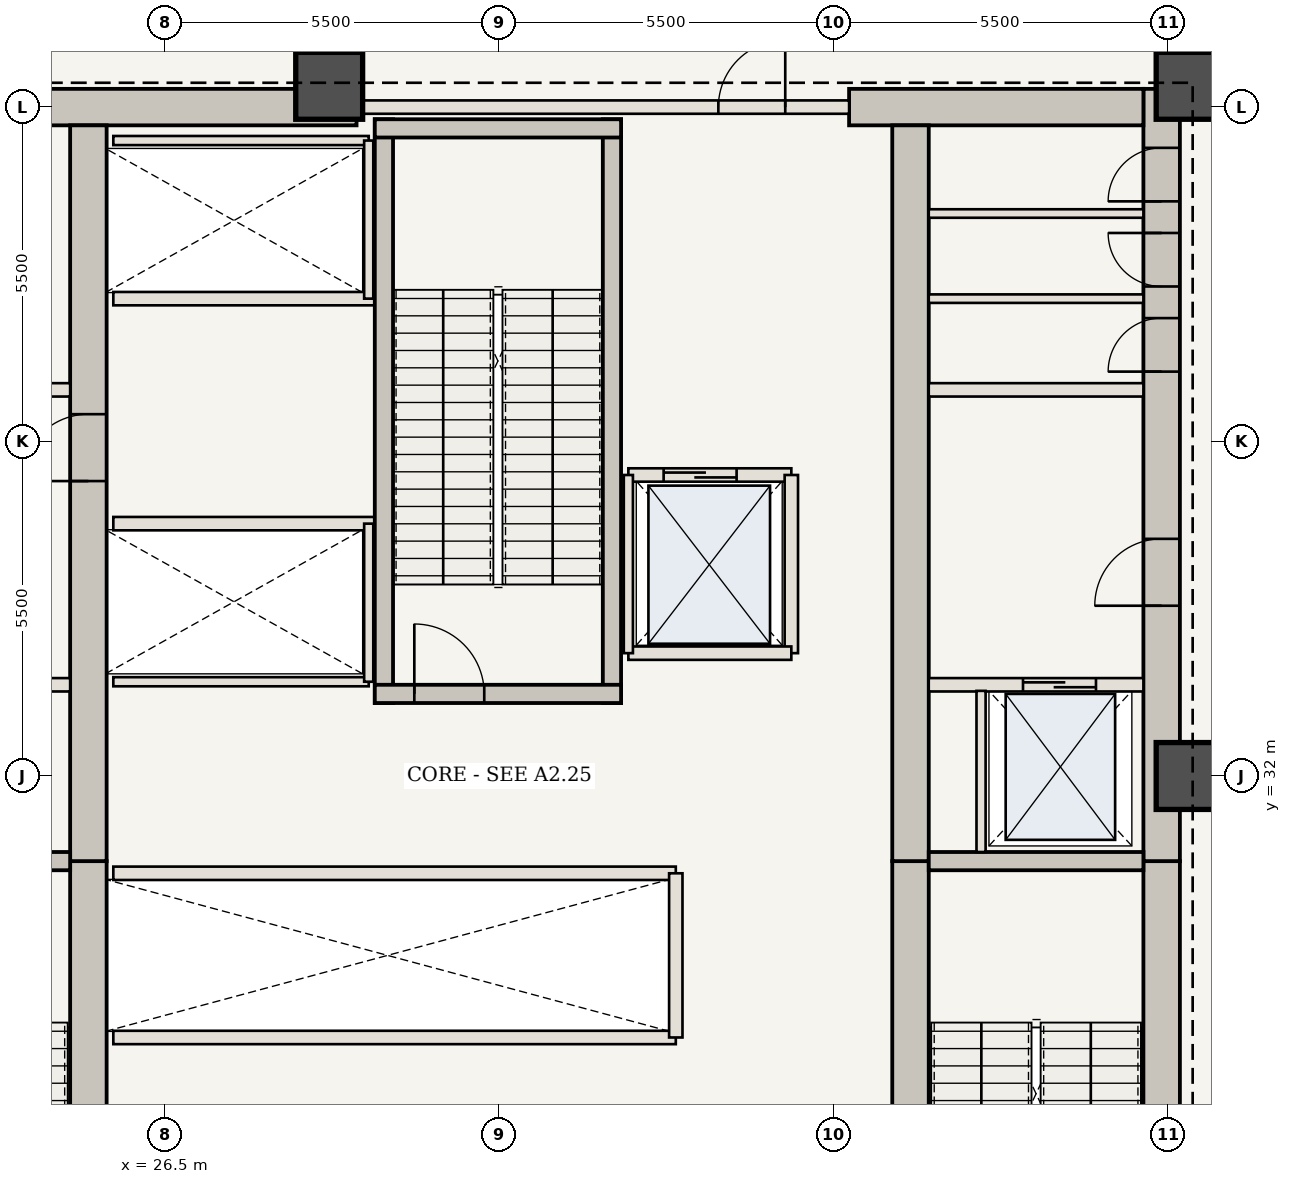
"""IFC4 building model, lengths in metres.
Left out: names, types, materials, properties, quantities, classifications, styles, units other than length and angle.
Written with IfcOpenShell. Run it as: python <this file> out.ifc"""

import sys

from ifc_helpers import new_model, si_unit, direction, frame, frame_2d, origin, origin_2d, place, context, subcontext, project, spatial, rectangle, extrude, element, fill, save


model = new_model("IFC4")
c1 = context("Model", 3, precision=1e-05, world=origin(), true_north=direction((0.0, 1.0)))
c2 = subcontext(c1, "Body", "Model", "MODEL_VIEW")
j1 = project(units=[si_unit("LENGTHUNIT", "METRE"), si_unit("PLANEANGLEUNIT", "RADIAN")], contexts=[c1])
p1 = place(None, origin())
s1 = spatial("IfcSite", under=j1, at=p1, CompositionType="ELEMENT")
p2 = place(p1, origin())
s2 = spatial("IfcBuilding", under=s1, at=p2, CompositionType="ELEMENT")
p3 = place(p2, frame((0.0, 0.0, 99.75)))
s3 = spatial("IfcBuildingStorey", under=s2, at=p3, CompositionType="ELEMENT", Elevation=99.75)
p4 = place(p3, frame((42.89, 20.65, 0.0), z_axis=(0.0, 0.0, 1.0), x_axis=(0.0, 1.0, 0.0)))
e1 = element("IfcWall", 1, at=p4, inside=s3, PredefinedType="SHEAR", context=c2, shape_type="SweptSolid", body=[
    extrude(rectangle(XDim=9.95, YDim=0.6, at=frame_2d((4.975, 0.0))), origin(), (0.0, 0.0, 1.0), 6.3),
])
p5 = place(p4, frame((1.1, 0.0, 0.0)))
e2 = element("IfcOpeningElement", 2, at=p5, cuts=e1, PredefinedType="OPENING", context=c2, shape_type="SweptSolid", body=[
    extrude(rectangle(XDim=1.15, YDim=2.15, at=frame_2d((0.575, 1.075))), frame((0.0, 0.31, 0.0), z_axis=(0.0, -1.0, 0.0), x_axis=(1.0, 0.0, 0.0)), (0.0, 0.0, 1.0), 0.62),
])
p6 = place(p3, frame((42.89, 30.6, 0.0), z_axis=(0.0, 0.0, 1.0), x_axis=(0.0, 1.0, 0.0)))
e3 = element("IfcWall", 3, at=p6, inside=s3, PredefinedType="SHEAR", context=c2, shape_type="SweptSolid", body=[
    extrude(rectangle(XDim=12.7, YDim=0.6, at=frame_2d((6.35, 0.0))), origin(), (0.0, 0.0, 1.0), 6.3),
])
p7 = place(p6, frame((4.2, 0.0, 0.0)))
e4 = element("IfcOpeningElement", 4, at=p7, cuts=e3, PredefinedType="OPENING", context=c2, shape_type="SweptSolid", body=[
    extrude(rectangle(XDim=1.1, YDim=2.15, at=frame_2d((0.55, 1.075))), frame((0.0, 0.31, 0.0), z_axis=(0.0, -1.0, 0.0), x_axis=(1.0, 0.0, 0.0)), (0.0, 0.0, 1.0), 0.62),
])
p8 = place(p6, frame((8.05, 0.0, 0.0)))
e5 = element("IfcOpeningElement", 5, at=p8, cuts=e3, PredefinedType="OPENING", context=c2, shape_type="SweptSolid", body=[
    extrude(rectangle(XDim=0.88, YDim=2.1, at=frame_2d((0.44, 1.05))), frame((0.0, 0.31, 0.0), z_axis=(0.0, -1.0, 0.0), x_axis=(1.0, 0.0, 0.0)), (0.0, 0.0, 1.0), 0.62),
])
p9 = place(p6, frame((9.45, 0.0, 0.0)))
e6 = element("IfcOpeningElement", 6, at=p9, cuts=e3, PredefinedType="OPENING", context=c2, shape_type="SweptSolid", body=[
    extrude(rectangle(XDim=0.88, YDim=2.1, at=frame_2d((0.44, 1.05))), frame((0.0, 0.31, 0.0), z_axis=(0.0, -1.0, 0.0), x_axis=(1.0, 0.0, 0.0)), (0.0, 0.0, 1.0), 0.62),
])
p10 = place(p6, frame((10.85, 0.0, 0.0)))
e7 = element("IfcOpeningElement", 7, at=p10, cuts=e3, PredefinedType="OPENING", context=c2, shape_type="SweptSolid", body=[
    extrude(rectangle(XDim=0.88, YDim=2.1, at=frame_2d((0.44, 1.05))), frame((0.0, 0.31, 0.0), z_axis=(0.0, -1.0, 0.0), x_axis=(1.0, 0.0, 0.0)), (0.0, 0.0, 1.0), 0.62),
])
p11 = place(p3, frame((21.41, 43.0, 0.0), z_axis=(0.0, 0.0, 1.0), x_axis=(1.0, 0.0, 0.0)))
e8 = element("IfcWall", 8, at=p11, inside=s3, PredefinedType="SHEAR", context=c2, shape_type="SweptSolid", body=[
    extrude(rectangle(XDim=8.24, YDim=0.6, at=frame_2d((4.12, 0.0))), origin(), (0.0, 0.0, 1.0), 6.3),
])
p12 = place(p3, frame((37.75, 43.0, 0.0), z_axis=(0.0, 0.0, 1.0), x_axis=(1.0, 0.0, 0.0)))
e9 = element("IfcWall", 9, at=p12, inside=s3, PredefinedType="SHEAR", context=c2, shape_type="SweptSolid", body=[
    extrude(rectangle(XDim=4.84, YDim=0.6, at=frame_2d((2.42, 0.0))), origin(), (0.0, 0.0, 1.0), 6.3),
])
p13 = place(p3, frame((25.24, 21.25, 0.0), z_axis=(0.0, 0.0, 1.0), x_axis=(0.0, 1.0, 0.0)))
e10 = element("IfcWall", 10, at=p13, inside=s3, PredefinedType="SHEAR", context=c2, shape_type="SweptSolid", body=[
    extrude(rectangle(XDim=9.35, YDim=0.6, at=frame_2d((4.675, 0.0))), origin(), (0.0, 0.0, 1.0), 6.3),
])
p14 = place(p3, frame((25.24, 30.6, 0.0), z_axis=(0.0, 0.0, 1.0), x_axis=(0.0, 1.0, 0.0)))
e11 = element("IfcWall", 11, at=p14, inside=s3, PredefinedType="SHEAR", context=c2, shape_type="SweptSolid", body=[
    extrude(rectangle(XDim=12.1, YDim=0.6, at=frame_2d((6.05, 0.0))), origin(), (0.0, 0.0, 1.0), 6.3),
])
p15 = place(p14, frame((6.25, 0.0, 0.0)))
e12 = element("IfcOpeningElement", 12, at=p15, cuts=e11, PredefinedType="OPENING", context=c2, shape_type="SweptSolid", body=[
    extrude(rectangle(XDim=1.1, YDim=2.15, at=frame_2d((0.55, 1.075))), frame((0.0, 0.31, 0.0), z_axis=(0.0, -1.0, 0.0), x_axis=(1.0, 0.0, 0.0)), (0.0, 0.0, 1.0), 0.62),
])
p16 = place(p3, frame((38.76, 21.25, 0.0), z_axis=(0.0, 0.0, 1.0), x_axis=(0.0, 1.0, 0.0)))
e13 = element("IfcWall", 13, at=p16, inside=s3, PredefinedType="SHEAR", context=c2, shape_type="SweptSolid", body=[
    extrude(rectangle(XDim=9.35, YDim=0.6, at=frame_2d((4.675, 0.0))), origin(), (0.0, 0.0, 1.0), 6.3),
])
p17 = place(p3, frame((38.76, 30.6, 0.0), z_axis=(0.0, 0.0, 1.0), x_axis=(0.0, 1.0, 0.0)))
e14 = element("IfcWall", 14, at=p17, inside=s3, PredefinedType="SHEAR", context=c2, shape_type="SweptSolid", body=[
    extrude(rectangle(XDim=12.1, YDim=0.6, at=frame_2d((6.05, 0.0))), origin(), (0.0, 0.0, 1.0), 6.3),
])
for number, where, z_axis, x_axis in (
    (15, (43.35, 32.0, 0.0), (0.0, 0.0, 1.0), (1.0, 0.0, 0.0)),
    (16, (43.35, 43.35, 0.0), (0.0, 0.0, 1.0), (1.0, 0.0, 0.0)),
    (17, (29.2, 43.35, 0.0), (0.0, 0.0, 1.0), (1.0, 0.0, 0.0)),
):
    element("IfcColumn", number, at=place(p3, frame(where, z_axis=z_axis, x_axis=x_axis)), inside=s3, PredefinedType="COLUMN", context=c2, shape_type="SweptSolid", body=[
        extrude(rectangle(XDim=1.1, YDim=1.1, at=origin_2d()), origin(), (0.0, 0.0, 1.0), 5.88),
    ])
for number, where, z_axis, x_axis in (
    (18, (21.41, 30.6, 0.0), (0.0, 0.0, 1.0), (1.0, 0.0, 0.0)),
    (19, (39.06, 30.6, 0.0), (0.0, 0.0, 1.0), (1.0, 0.0, 0.0)),
):
    element("IfcWall", number, at=place(p3, frame(where, z_axis=z_axis, x_axis=x_axis)), inside=s3, PredefinedType="SHEAR", context=c2, shape_type="SweptSolid", body=[
        extrude(rectangle(XDim=3.53, YDim=0.3, at=frame_2d((1.765, 0.0))), origin(), (0.0, 0.0, 1.0), 5.88),
    ])
p18 = place(p3, frame((21.41, 33.5, 0.0), z_axis=(0.0, 0.0, 1.0), x_axis=(1.0, 0.0, 0.0)))
e20 = element("IfcWall", 20, at=p18, inside=s3, PredefinedType="STANDARD", context=c2, shape_type="SweptSolid", body=[
    extrude(rectangle(XDim=3.53, YDim=0.22, at=frame_2d((1.765, 0.0))), origin(), (0.0, 0.0, 1.0), 5.88),
])
p19 = place(p18, frame((0.75, 0.0, 0.0)))
e21 = element("IfcOpeningElement", 21, at=p19, cuts=e20, PredefinedType="OPENING", context=c2, shape_type="SweptSolid", body=[
    extrude(rectangle(XDim=1.2, YDim=2.2, at=frame_2d((0.6, 1.1))), frame((0.0, 0.12, 0.0), z_axis=(0.0, -1.0, 0.0), x_axis=(1.0, 0.0, 0.0)), (0.0, 0.0, 1.0), 0.24),
])
p20 = place(p3, frame((39.06, 33.5, 0.0), z_axis=(0.0, 0.0, 1.0), x_axis=(1.0, 0.0, 0.0)))
e22 = element("IfcWall", 22, at=p20, inside=s3, PredefinedType="STANDARD", context=c2, shape_type="SweptSolid", body=[
    extrude(rectangle(XDim=3.53, YDim=0.22, at=frame_2d((1.765, 0.0))), origin(), (0.0, 0.0, 1.0), 5.88),
])
p21 = place(p20, frame((1.55, 0.0, 0.0)))
e23 = element("IfcOpeningElement", 23, at=p21, cuts=e22, PredefinedType="OPENING", context=c2, shape_type="SweptSolid", body=[
    extrude(rectangle(XDim=1.2, YDim=2.2, at=frame_2d((0.6, 1.1))), frame((0.0, 0.12, 0.0), z_axis=(0.0, -1.0, 0.0), x_axis=(1.0, 0.0, 0.0)), (0.0, 0.0, 1.0), 0.24),
])
p22 = place(p3, frame((39.92, 30.75, 0.0), z_axis=(0.0, 0.0, 1.0), x_axis=(0.0, 1.0, 0.0)))
e24 = element("IfcWall", 24, at=p22, inside=s3, PredefinedType="STANDARD", context=c2, shape_type="SweptSolid", body=[
    extrude(rectangle(XDim=2.65, YDim=0.15, at=frame_2d((1.325, 0.0))), origin(), (0.0, 0.0, 1.0), 5.88),
])
for number, where, z_axis, x_axis in (
    (25, (21.41, 38.35, 0.0), (0.0, 0.0, 1.0), (1.0, 0.0, 0.0)),
    (26, (39.06, 38.35, 0.0), (0.0, 0.0, 1.0), (1.0, 0.0, 0.0)),
):
    element("IfcWall", number, at=place(p3, frame(where, z_axis=z_axis, x_axis=x_axis)), inside=s3, PredefinedType="STANDARD", context=c2, shape_type="SweptSolid", body=[
        extrude(rectangle(XDim=3.53, YDim=0.22, at=frame_2d((1.765, 0.0))), origin(), (0.0, 0.0, 1.0), 5.88),
    ])
for number, where, z_axis, x_axis in (
    (27, (39.06, 39.85, 0.0), (0.0, 0.0, 1.0), (1.0, 0.0, 0.0)),
    (28, (39.06, 41.25, 0.0), (0.0, 0.0, 1.0), (1.0, 0.0, 0.0)),
):
    element("IfcWall", number, at=place(p3, frame(where, z_axis=z_axis, x_axis=x_axis)), inside=s3, PredefinedType="STANDARD", context=c2, shape_type="SweptSolid", body=[
        extrude(rectangle(XDim=3.53, YDim=0.14, at=frame_2d((1.765, 0.0))), origin(), (0.0, 0.0, 1.0), 5.88),
    ])
for number, where, z_axis, x_axis in (
    (29, (25.65, 27.7, 0.0), (0.0, 0.0, 1.0), (1.0, 0.0, 0.0)),
    (30, (25.65, 30.4, 0.0), (0.0, 0.0, 1.0), (1.0, 0.0, 0.0)),
):
    element("IfcWall", number, at=place(p3, frame(where, z_axis=z_axis, x_axis=x_axis)), inside=s3, PredefinedType="STANDARD", context=c2, shape_type="SweptSolid", body=[
        extrude(rectangle(XDim=9.25, YDim=0.22, at=frame_2d((4.625, 0.0))), origin(), (0.0, 0.0, 1.0), 5.88),
    ])
p23 = place(p3, frame((34.9, 27.7, 0.0), z_axis=(0.0, 0.0, 1.0), x_axis=(0.0, 1.0, 0.0)))
e31 = element("IfcWall", 31, at=p23, inside=s3, PredefinedType="STANDARD", context=c2, shape_type="SweptSolid", body=[
    extrude(rectangle(XDim=2.7, YDim=0.22, at=frame_2d((1.35, 0.0))), origin(), (0.0, 0.0, 1.0), 5.88),
])
p24 = place(p3, frame((25.65, 36.15, 0.0), z_axis=(0.0, 0.0, 1.0), x_axis=(1.0, 0.0, 0.0)))
e32 = element("IfcWall", 32, at=p24, inside=s3, PredefinedType="STANDARD", context=c2, shape_type="SweptSolid", body=[
    extrude(rectangle(XDim=4.3, YDim=0.22, at=frame_2d((2.15, 0.0))), origin(), (0.0, 0.0, 1.0), 5.88),
])
p25 = place(p3, frame((25.65, 33.55, 0.0), z_axis=(0.0, 0.0, 1.0), x_axis=(1.0, 0.0, 0.0)))
e33 = element("IfcWall", 33, at=p25, inside=s3, PredefinedType="STANDARD", context=c2, shape_type="SweptSolid", body=[
    extrude(rectangle(XDim=4.2, YDim=0.15, at=frame_2d((2.1, 0.0))), origin(), (0.0, 0.0, 1.0), 5.88),
])
p26 = place(p3, frame((29.85, 33.55, 0.0), z_axis=(0.0, 0.0, 1.0), x_axis=(0.0, 1.0, 0.0)))
e34 = element("IfcWall", 34, at=p26, inside=s3, PredefinedType="STANDARD", context=c2, shape_type="SweptSolid", body=[
    extrude(rectangle(XDim=2.6, YDim=0.15, at=frame_2d((1.3, 0.0))), origin(), (0.0, 0.0, 1.0), 5.88),
])
p27 = place(p3, frame((25.65, 39.85, 0.0), z_axis=(0.0, 0.0, 1.0), x_axis=(1.0, 0.0, 0.0)))
e35 = element("IfcWall", 35, at=p27, inside=s3, PredefinedType="STANDARD", context=c2, shape_type="SweptSolid", body=[
    extrude(rectangle(XDim=4.3, YDim=0.22, at=frame_2d((2.15, 0.0))), origin(), (0.0, 0.0, 1.0), 5.88),
])
p28 = place(p3, frame((25.65, 42.45, 0.0), z_axis=(0.0, 0.0, 1.0), x_axis=(1.0, 0.0, 0.0)))
e36 = element("IfcWall", 36, at=p28, inside=s3, PredefinedType="STANDARD", context=c2, shape_type="SweptSolid", body=[
    extrude(rectangle(XDim=4.2, YDim=0.15, at=frame_2d((2.1, 0.0))), origin(), (0.0, 0.0, 1.0), 5.88),
])
p29 = place(p3, frame((29.85, 39.85, 0.0), z_axis=(0.0, 0.0, 1.0), x_axis=(0.0, 1.0, 0.0)))
e37 = element("IfcWall", 37, at=p29, inside=s3, PredefinedType="STANDARD", context=c2, shape_type="SweptSolid", body=[
    extrude(rectangle(XDim=2.6, YDim=0.15, at=frame_2d((1.3, 0.0))), origin(), (0.0, 0.0, 1.0), 5.88),
])
for number, where, z_axis, x_axis in (
    (38, (30.1, 33.2, 0.0), (0.0, 0.0, 1.0), (0.0, 1.0, 0.0)),
    (39, (33.85, 33.2, 0.0), (0.0, 0.0, 1.0), (0.0, 1.0, 0.0)),
):
    element("IfcWall", number, at=place(p3, frame(where, z_axis=z_axis, x_axis=x_axis)), inside=s3, PredefinedType="SHEAR", context=c2, shape_type="SweptSolid", body=[
        extrude(rectangle(XDim=9.6, YDim=0.3, at=frame_2d((4.8, 0.0))), origin(), (0.0, 0.0, 1.0), 5.88),
    ])
p30 = place(p3, frame((29.95, 33.35, 0.0), z_axis=(0.0, 0.0, 1.0), x_axis=(1.0, 0.0, 0.0)))
e40 = element("IfcWall", 40, at=p30, inside=s3, PredefinedType="SHEAR", context=c2, shape_type="SweptSolid", body=[
    extrude(rectangle(XDim=4.05, YDim=0.3, at=frame_2d((2.025, 0.0))), origin(), (0.0, 0.0, 1.0), 5.88),
])
p31 = place(p30, frame((0.65, 0.0, 0.0)))
e41 = element("IfcOpeningElement", 41, at=p31, cuts=e40, PredefinedType="OPENING", context=c2, shape_type="SweptSolid", body=[
    extrude(rectangle(XDim=1.15, YDim=2.15, at=frame_2d((0.575, 1.075))), frame((0.0, 0.16, 0.0), z_axis=(0.0, -1.0, 0.0), x_axis=(1.0, 0.0, 0.0)), (0.0, 0.0, 1.0), 0.32),
])
p32 = place(p3, frame((29.95, 42.65, 0.0), z_axis=(0.0, 0.0, 1.0), x_axis=(1.0, 0.0, 0.0)))
e42 = element("IfcWall", 42, at=p32, inside=s3, PredefinedType="SHEAR", context=c2, shape_type="SweptSolid", body=[
    extrude(rectangle(XDim=4.05, YDim=0.3, at=frame_2d((2.025, 0.0))), origin(), (0.0, 0.0, 1.0), 5.88),
])
p33 = place(p3, frame((29.65, 43.0, 0.0), z_axis=(0.0, 0.0, 1.0), x_axis=(1.0, 0.0, 0.0)))
e43 = element("IfcWall", 43, at=p33, inside=s3, PredefinedType="STANDARD", context=c2, shape_type="SweptSolid", body=[
    extrude(rectangle(XDim=8.1, YDim=0.22, at=frame_2d((4.05, 0.0))), origin(), (0.0, 0.0, 1.0), 5.88),
])
p34 = place(p33, frame((5.95, 0.0, 0.0)))
e44 = element("IfcOpeningElement", 44, at=p34, cuts=e43, PredefinedType="OPENING", context=c2, shape_type="SweptSolid", body=[
    extrude(rectangle(XDim=1.1, YDim=2.15, at=frame_2d((0.55, 1.075))), frame((0.0, 0.12, 0.0), z_axis=(0.0, -1.0, 0.0), x_axis=(1.0, 0.0, 0.0)), (0.0, 0.0, 1.0), 0.24),
])
p35 = place(p3, frame((34.12, 36.95, 0.0), z_axis=(0.0, 0.0, 1.0), x_axis=(1.0, 0.0, 0.0)))
e45 = element("IfcWall", 45, at=p35, inside=s3, PredefinedType="STANDARD", context=c2, shape_type="SweptSolid", body=[
    extrude(rectangle(XDim=2.68, YDim=0.22, at=frame_2d((1.34, 0.0))), origin(), (0.0, 0.0, 1.0), 5.88),
])
p36 = place(p35, frame((0.58, 0.0, 0.0)))
e46 = element("IfcOpeningElement", 46, at=p36, cuts=e45, PredefinedType="OPENING", context=c2, shape_type="SweptSolid", body=[
    extrude(rectangle(XDim=1.2, YDim=2.2, at=frame_2d((0.6, 1.1))), frame((0.0, 0.12, 0.0), z_axis=(0.0, -1.0, 0.0), x_axis=(1.0, 0.0, 0.0)), (0.0, 0.0, 1.0), 0.24),
])
p37 = place(p3, frame((36.8, 34.02, 0.0), z_axis=(0.0, 0.0, 1.0), x_axis=(0.0, 1.0, 0.0)))
e47 = element("IfcWall", 47, at=p37, inside=s3, PredefinedType="STANDARD", context=c2, shape_type="SweptSolid", body=[
    extrude(rectangle(XDim=2.93, YDim=0.22, at=frame_2d((1.465, 0.0))), origin(), (0.0, 0.0, 1.0), 5.88),
])
p38 = place(p3, frame((34.12, 34.02, 0.0), z_axis=(0.0, 0.0, 1.0), x_axis=(1.0, 0.0, 0.0)))
e48 = element("IfcWall", 48, at=p38, inside=s3, PredefinedType="STANDARD", context=c2, shape_type="SweptSolid", body=[
    extrude(rectangle(XDim=2.68, YDim=0.22, at=frame_2d((1.34, 0.0))), origin(), (0.0, 0.0, 1.0), 5.88),
])
p39 = place(p3, frame((34.12, 34.02, 0.0), z_axis=(0.0, 0.0, 1.0), x_axis=(0.0, 1.0, 0.0)))
e49 = element("IfcWall", 49, at=p39, inside=s3, PredefinedType="STANDARD", context=c2, shape_type="SweptSolid", body=[
    extrude(rectangle(XDim=2.93, YDim=0.15, at=frame_2d((1.465, 0.0))), origin(), (0.0, 0.0, 1.0), 5.88),
])
p40 = place(p7, origin())
e50 = element("IfcDoor", 50, at=p40, inside=s3, OperationType="SINGLE_SWING_LEFT", PredefinedType="DOOR", context=c2, shape_type="SweptSolid", body=[
    extrude(rectangle(XDim=1.1, YDim=2.15, at=frame_2d((0.55, 1.075))), frame((0.0, 0.025, 0.0), z_axis=(0.0, -1.0, 0.0), x_axis=(1.0, 0.0, 0.0)), (0.0, 0.0, 1.0), 0.05),
])
fill(e4, e50)
p41 = place(p15, origin())
e51 = element("IfcDoor", 51, at=p41, inside=s3, OperationType="SINGLE_SWING_LEFT", PredefinedType="DOOR", context=c2, shape_type="SweptSolid", body=[
    extrude(rectangle(XDim=1.1, YDim=2.15, at=frame_2d((0.55, 1.075))), frame((0.0, 0.025, 0.0), z_axis=(0.0, -1.0, 0.0), x_axis=(1.0, 0.0, 0.0)), (0.0, 0.0, 1.0), 0.05),
])
fill(e12, e51)
p42 = place(p8, origin())
e52 = element("IfcDoor", 52, at=p42, inside=s3, OperationType="SINGLE_SWING_LEFT", PredefinedType="DOOR", context=c2, shape_type="SweptSolid", body=[
    extrude(rectangle(XDim=0.88, YDim=2.1, at=frame_2d((0.44, 1.05))), frame((0.0, 0.025, 0.0), z_axis=(0.0, -1.0, 0.0), x_axis=(1.0, 0.0, 0.0)), (0.0, 0.0, 1.0), 0.05),
])
fill(e5, e52)
p43 = place(p9, origin())
e53 = element("IfcDoor", 53, at=p43, inside=s3, OperationType="SINGLE_SWING_RIGHT", PredefinedType="DOOR", context=c2, shape_type="SweptSolid", body=[
    extrude(rectangle(XDim=0.88, YDim=2.1, at=frame_2d((0.44, 1.05))), frame((0.0, 0.025, 0.0), z_axis=(0.0, -1.0, 0.0), x_axis=(1.0, 0.0, 0.0)), (0.0, 0.0, 1.0), 0.05),
])
fill(e6, e53)
p44 = place(p10, origin())
e54 = element("IfcDoor", 54, at=p44, inside=s3, OperationType="SINGLE_SWING_LEFT", PredefinedType="DOOR", context=c2, shape_type="SweptSolid", body=[
    extrude(rectangle(XDim=0.88, YDim=2.1, at=frame_2d((0.44, 1.05))), frame((0.0, 0.025, 0.0), z_axis=(0.0, -1.0, 0.0), x_axis=(1.0, 0.0, 0.0)), (0.0, 0.0, 1.0), 0.05),
])
fill(e7, e54)
p45 = place(p21, origin())
e55 = element("IfcDoor", 55, at=p45, inside=s3, OperationType="DOUBLE_DOOR_SLIDING", PredefinedType="DOOR", context=c2, shape_type="SweptSolid", body=[
    extrude(rectangle(XDim=1.2, YDim=2.2, at=frame_2d((0.6, 1.1))), frame((0.0, 0.025, 0.0), z_axis=(0.0, -1.0, 0.0), x_axis=(1.0, 0.0, 0.0)), (0.0, 0.0, 1.0), 0.05),
])
fill(e23, e55)
p46 = place(p31, origin())
e56 = element("IfcDoor", 56, at=p46, inside=s3, OperationType="SINGLE_SWING_LEFT", PredefinedType="DOOR", context=c2, shape_type="SweptSolid", body=[
    extrude(rectangle(XDim=1.15, YDim=2.15, at=frame_2d((0.575, 1.075))), frame((0.0, 0.025, 0.0), z_axis=(0.0, -1.0, 0.0), x_axis=(1.0, 0.0, 0.0)), (0.0, 0.0, 1.0), 0.05),
])
fill(e41, e56)
p47 = place(p34, origin())
e57 = element("IfcDoor", 57, at=p47, inside=s3, OperationType="SINGLE_SWING_RIGHT", PredefinedType="DOOR", context=c2, shape_type="SweptSolid", body=[
    extrude(rectangle(XDim=1.1, YDim=2.15, at=frame_2d((0.55, 1.075))), frame((0.0, 0.025, 0.0), z_axis=(0.0, -1.0, 0.0), x_axis=(1.0, 0.0, 0.0)), (0.0, 0.0, 1.0), 0.05),
])
fill(e44, e57)
p48 = place(p36, origin())
e58 = element("IfcDoor", 58, at=p48, inside=s3, OperationType="DOUBLE_DOOR_SLIDING", PredefinedType="DOOR", context=c2, shape_type="SweptSolid", body=[
    extrude(rectangle(XDim=1.2, YDim=2.2, at=frame_2d((0.6, 1.1))), frame((0.0, 0.025, 0.0), z_axis=(0.0, -1.0, 0.0), x_axis=(1.0, 0.0, 0.0)), (0.0, 0.0, 1.0), 0.05),
])
fill(e46, e58)
save(model, sys.argv[1])
